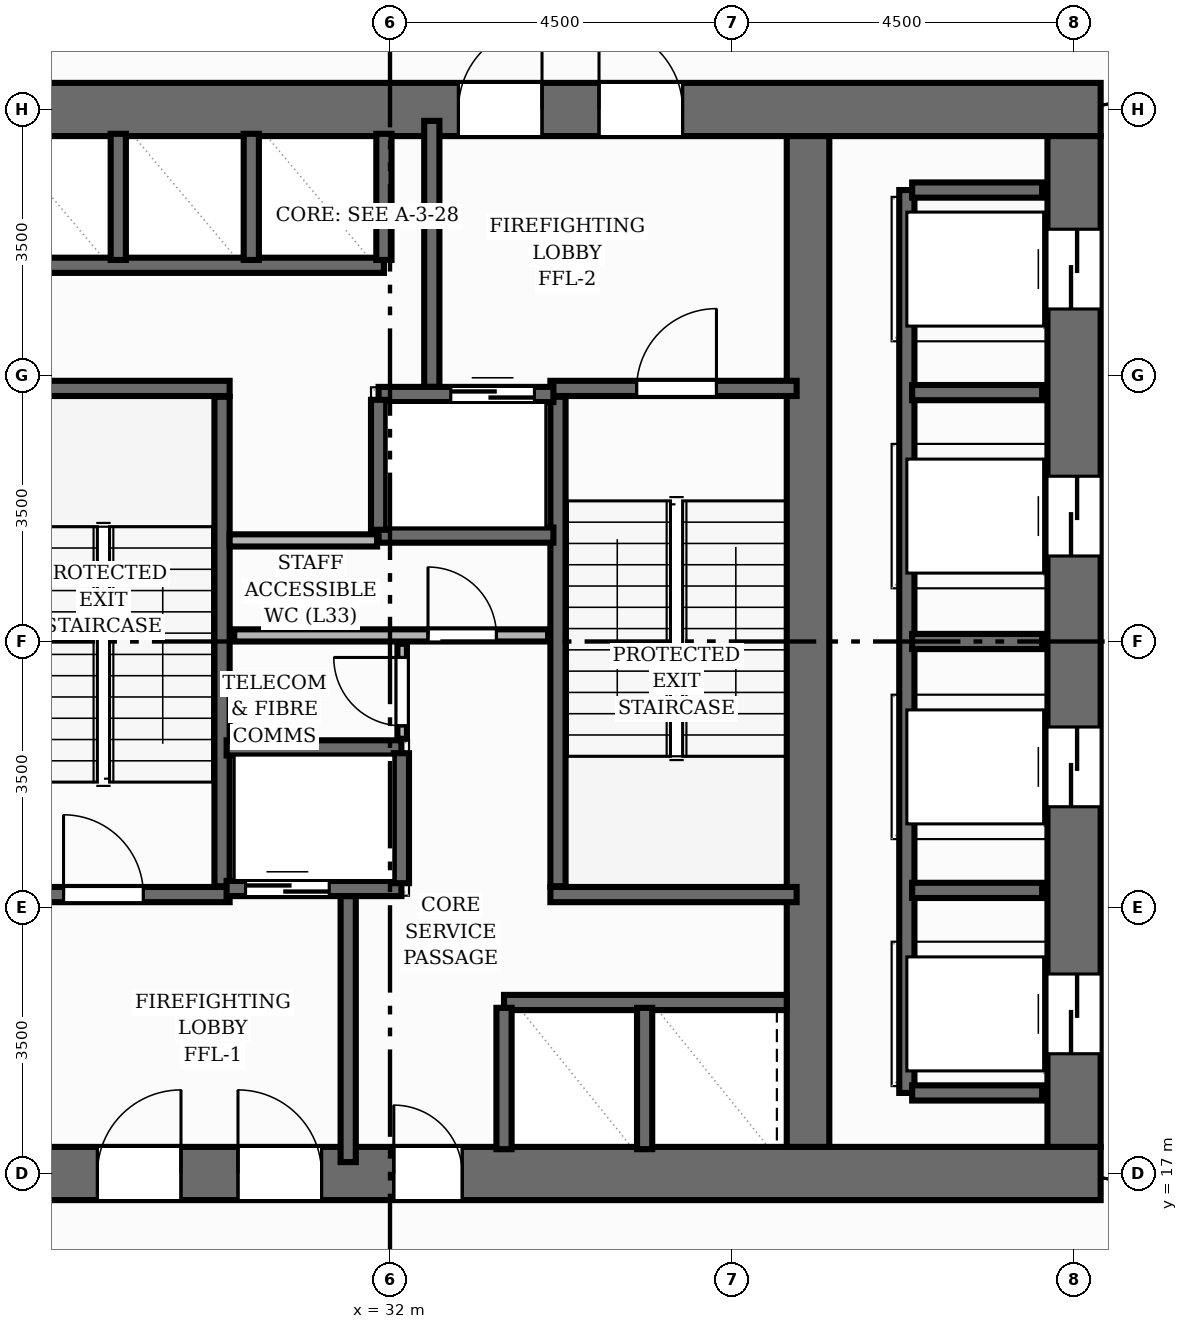
"""IFC4 building model, lengths in metres.
Left out: names, types, materials, properties, quantities, classifications, styles, units other than length and angle.
Written with IfcOpenShell. Run it as: python <this file> out.ifc"""

import sys

from ifc_helpers import new_model, si_unit, direction, frame, frame_2d, origin, place, context, subcontext, project, spatial, rectangle, extrude, element, fill, save


model = new_model("IFC4")
c1 = context("Model", 3, precision=1e-05, world=origin(), true_north=direction((0.0, 1.0)))
c2 = subcontext(c1, "Body", "Model", "MODEL_VIEW")
j1 = project(units=[si_unit("LENGTHUNIT", "METRE"), si_unit("PLANEANGLEUNIT", "RADIAN")], contexts=[c1])
p1 = place(None, origin())
s1 = spatial("IfcSite", under=j1, at=p1, CompositionType="ELEMENT")
p2 = place(p1, origin())
s2 = spatial("IfcBuilding", under=s1, at=p2, CompositionType="ELEMENT")
p3 = place(p2, frame((0.0, 0.0, 112.48)))
s3 = spatial("IfcBuildingStorey", under=s2, at=p3, CompositionType="ELEMENT", Elevation=112.48)
p4 = place(p3, frame((22.65, 17.0, 0.0), z_axis=(0.0, 0.0, 1.0), x_axis=(1.0, 0.0, 0.0)))
e1 = element("IfcWall", 1, at=p4, inside=s3, PredefinedType="SHEAR", context=c2, shape_type="SweptSolid", body=[
    extrude(rectangle(XDim=18.7, YDim=0.7, at=frame_2d((9.35, 0.0))), origin(), (0.0, 0.0, 1.0), 4.48),
])
p5 = place(p4, frame((5.5, 0.0, 0.0)))
e2 = element("IfcOpeningElement", 2, at=p5, cuts=e1, PredefinedType="OPENING", context=c2, shape_type="SweptSolid", body=[
    extrude(rectangle(XDim=1.1, YDim=2.15, at=frame_2d((0.55, 1.075))), frame((0.0, 0.36, 0.0), z_axis=(0.0, -1.0, 0.0), x_axis=(1.0, 0.0, 0.0)), (0.0, 0.0, 1.0), 0.72),
])
p6 = place(p4, frame((7.35, 0.0, 0.0)))
e3 = element("IfcOpeningElement", 3, at=p6, cuts=e1, PredefinedType="OPENING", context=c2, shape_type="SweptSolid", body=[
    extrude(rectangle(XDim=1.1, YDim=2.15, at=frame_2d((0.55, 1.075))), frame((0.0, 0.36, 0.0), z_axis=(0.0, -1.0, 0.0), x_axis=(1.0, 0.0, 0.0)), (0.0, 0.0, 1.0), 0.72),
])
p7 = place(p4, frame((9.4, 0.0, 0.0)))
e4 = element("IfcOpeningElement", 4, at=p7, cuts=e1, PredefinedType="OPENING", context=c2, shape_type="SweptSolid", body=[
    extrude(rectangle(XDim=0.9, YDim=2.1, at=frame_2d((0.45, 1.05))), frame((0.0, 0.36, 0.0), z_axis=(0.0, -1.0, 0.0), x_axis=(1.0, 0.0, 0.0)), (0.0, 0.0, 1.0), 0.72),
])
p8 = place(p3, frame((22.65, 31.0, 0.0), z_axis=(0.0, 0.0, 1.0), x_axis=(1.0, 0.0, 0.0)))
e5 = element("IfcWall", 5, at=p8, inside=s3, PredefinedType="SHEAR", context=c2, shape_type="SweptSolid", body=[
    extrude(rectangle(XDim=18.7, YDim=0.7, at=frame_2d((9.35, 0.0))), origin(), (0.0, 0.0, 1.0), 4.48),
])
p9 = place(p8, frame((10.25, 0.0, 0.0)))
e6 = element("IfcOpeningElement", 6, at=p9, cuts=e5, PredefinedType="OPENING", context=c2, shape_type="SweptSolid", body=[
    extrude(rectangle(XDim=1.1, YDim=2.15, at=frame_2d((0.55, 1.075))), frame((0.0, 0.36, 0.0), z_axis=(0.0, -1.0, 0.0), x_axis=(1.0, 0.0, 0.0)), (0.0, 0.0, 1.0), 0.72),
])
p10 = place(p8, frame((12.1, 0.0, 0.0)))
e7 = element("IfcOpeningElement", 7, at=p10, cuts=e5, PredefinedType="OPENING", context=c2, shape_type="SweptSolid", body=[
    extrude(rectangle(XDim=1.1, YDim=2.15, at=frame_2d((0.55, 1.075))), frame((0.0, 0.36, 0.0), z_axis=(0.0, -1.0, 0.0), x_axis=(1.0, 0.0, 0.0)), (0.0, 0.0, 1.0), 0.72),
])
p11 = place(p3, frame((41.0, 17.35, 0.0), z_axis=(0.0, 0.0, 1.0), x_axis=(0.0, 1.0, 0.0)))
e8 = element("IfcWall", 8, at=p11, inside=s3, PredefinedType="SHEAR", context=c2, shape_type="SweptSolid", body=[
    extrude(rectangle(XDim=13.3, YDim=0.7, at=frame_2d((6.65, 0.0))), origin(), (0.0, 0.0, 1.0), 4.48),
])
p12 = place(p11, frame((1.225, 0.0, 0.0)))
e9 = element("IfcOpeningElement", 9, at=p12, cuts=e8, PredefinedType="OPENING", context=c2, shape_type="SweptSolid", body=[
    extrude(rectangle(XDim=1.05, YDim=2.15, at=frame_2d((0.525, 1.075))), frame((0.0, 0.36, 0.0), z_axis=(0.0, -1.0, 0.0), x_axis=(1.0, 0.0, 0.0)), (0.0, 0.0, 1.0), 0.72),
])
p13 = place(p11, frame((4.475, 0.0, 0.0)))
e10 = element("IfcOpeningElement", 10, at=p13, cuts=e8, PredefinedType="OPENING", context=c2, shape_type="SweptSolid", body=[
    extrude(rectangle(XDim=1.05, YDim=2.15, at=frame_2d((0.525, 1.075))), frame((0.0, 0.36, 0.0), z_axis=(0.0, -1.0, 0.0), x_axis=(1.0, 0.0, 0.0)), (0.0, 0.0, 1.0), 0.72),
])
p14 = place(p11, frame((7.775, 0.0, 0.0)))
e11 = element("IfcOpeningElement", 11, at=p14, cuts=e8, PredefinedType="OPENING", context=c2, shape_type="SweptSolid", body=[
    extrude(rectangle(XDim=1.05, YDim=2.15, at=frame_2d((0.525, 1.075))), frame((0.0, 0.36, 0.0), z_axis=(0.0, -1.0, 0.0), x_axis=(1.0, 0.0, 0.0)), (0.0, 0.0, 1.0), 0.72),
])
p15 = place(p11, frame((11.025, 0.0, 0.0)))
e12 = element("IfcOpeningElement", 12, at=p15, cuts=e8, PredefinedType="OPENING", context=c2, shape_type="SweptSolid", body=[
    extrude(rectangle(XDim=1.05, YDim=2.15, at=frame_2d((0.525, 1.075))), frame((0.0, 0.36, 0.0), z_axis=(0.0, -1.0, 0.0), x_axis=(1.0, 0.0, 0.0)), (0.0, 0.0, 1.0), 0.72),
])
p16 = place(p3, frame((37.5, 17.35, 0.0), z_axis=(0.0, 0.0, 1.0), x_axis=(0.0, 1.0, 0.0)))
e13 = element("IfcWall", 13, at=p16, inside=s3, PredefinedType="SHEAR", context=c2, shape_type="SweptSolid", body=[
    extrude(rectangle(XDim=13.3, YDim=0.56, at=frame_2d((6.65, 0.0))), origin(), (0.0, 0.0, 1.0), 4.48),
])
p17 = place(p3, frame((29.79, 20.78, 0.0), z_axis=(0.0, 0.0, 1.0), x_axis=(0.0, 1.0, 0.0)))
e14 = element("IfcWall", 14, at=p17, inside=s3, PredefinedType="SHEAR", context=c2, shape_type="SweptSolid", body=[
    extrude(rectangle(XDim=6.44, YDim=0.2, at=frame_2d((3.22, 0.0))), origin(), (0.0, 0.0, 1.0), 4.48),
])
p18 = place(p3, frame((26.65, 27.33, 0.0), z_axis=(0.0, 0.0, 1.0), x_axis=(1.0, 0.0, 0.0)))
e15 = element("IfcWall", 15, at=p18, inside=s3, PredefinedType="SHEAR", context=c2, shape_type="SweptSolid", body=[
    extrude(rectangle(XDim=3.24, YDim=0.2, at=frame_2d((1.62, 0.0))), origin(), (0.0, 0.0, 1.0), 4.48),
])
p19 = place(p3, frame((26.65, 20.67, 0.0), z_axis=(0.0, 0.0, 1.0), x_axis=(1.0, 0.0, 0.0)))
e16 = element("IfcWall", 16, at=p19, inside=s3, PredefinedType="SHEAR", context=c2, shape_type="SweptSolid", body=[
    extrude(rectangle(XDim=3.24, YDim=0.2, at=frame_2d((1.62, 0.0))), origin(), (0.0, 0.0, 1.0), 4.48),
])
p20 = place(p19, frame((1.055, 0.0, 0.0)))
e17 = element("IfcOpeningElement", 17, at=p20, cuts=e16, PredefinedType="OPENING", context=c2, shape_type="SweptSolid", body=[
    extrude(rectangle(XDim=1.05, YDim=2.15, at=frame_2d((0.525, 1.075))), frame((0.0, 0.11, 0.0), z_axis=(0.0, -1.0, 0.0), x_axis=(1.0, 0.0, 0.0)), (0.0, 0.0, 1.0), 0.22),
])
p21 = place(p3, frame((34.21, 20.78, 0.0), z_axis=(0.0, 0.0, 1.0), x_axis=(0.0, 1.0, 0.0)))
e18 = element("IfcWall", 18, at=p21, inside=s3, PredefinedType="SHEAR", context=c2, shape_type="SweptSolid", body=[
    extrude(rectangle(XDim=6.44, YDim=0.2, at=frame_2d((3.22, 0.0))), origin(), (0.0, 0.0, 1.0), 4.48),
])
p22 = place(p3, frame((34.11, 20.67, 0.0), z_axis=(0.0, 0.0, 1.0), x_axis=(1.0, 0.0, 0.0)))
e19 = element("IfcWall", 19, at=p22, inside=s3, PredefinedType="SHEAR", context=c2, shape_type="SweptSolid", body=[
    extrude(rectangle(XDim=3.24, YDim=0.2, at=frame_2d((1.62, 0.0))), origin(), (0.0, 0.0, 1.0), 4.48),
])
p23 = place(p3, frame((34.11, 27.33, 0.0), z_axis=(0.0, 0.0, 1.0), x_axis=(1.0, 0.0, 0.0)))
e20 = element("IfcWall", 20, at=p23, inside=s3, PredefinedType="SHEAR", context=c2, shape_type="SweptSolid", body=[
    extrude(rectangle(XDim=3.24, YDim=0.2, at=frame_2d((1.62, 0.0))), origin(), (0.0, 0.0, 1.0), 4.48),
])
p24 = place(p23, frame((1.135, 0.0, 0.0)))
e21 = element("IfcOpeningElement", 21, at=p24, cuts=e20, PredefinedType="OPENING", context=c2, shape_type="SweptSolid", body=[
    extrude(rectangle(XDim=1.05, YDim=2.15, at=frame_2d((0.525, 1.075))), frame((0.0, 0.11, 0.0), z_axis=(0.0, -1.0, 0.0), x_axis=(1.0, 0.0, 0.0)), (0.0, 0.0, 1.0), 0.22),
])
for number, where, z_axis, x_axis in (
    (22, (31.45, 17.15, 0.0), (0.0, 0.0, 1.0), (0.0, 1.0, 0.0)),
    (23, (32.55, 27.35, 0.0), (0.0, 0.0, 1.0), (0.0, 1.0, 0.0)),
):
    element("IfcWall", number, at=place(p3, frame(where, z_axis=z_axis, x_axis=x_axis)), inside=s3, PredefinedType="SHEAR", context=c2, shape_type="SweptSolid", body=[
        extrude(rectangle(XDim=3.5, YDim=0.2, at=frame_2d((1.75, 0.0))), origin(), (0.0, 0.0, 1.0), 4.48),
    ])
p25 = place(p3, frame((29.85, 20.75, 0.0), z_axis=(0.0, 0.0, 1.0), x_axis=(1.0, 0.0, 0.0)))
e24 = element("IfcWall", 24, at=p25, inside=s3, PredefinedType="SHEAR", context=c2, shape_type="SweptSolid", body=[
    extrude(rectangle(XDim=2.3, YDim=0.2, at=frame_2d((1.15, 0.0))), origin(), (0.0, 0.0, 1.0), 4.48),
])
p26 = place(p25, frame((0.25, 0.0, 0.0)))
e25 = element("IfcOpeningElement", 25, at=p26, cuts=e24, PredefinedType="OPENING", context=c2, shape_type="SweptSolid", body=[
    extrude(rectangle(XDim=1.1, YDim=2.15, at=frame_2d((0.55, 1.075))), frame((0.0, 0.11, 0.0), z_axis=(0.0, -1.0, 0.0), x_axis=(1.0, 0.0, 0.0)), (0.0, 0.0, 1.0), 0.22),
])
p27 = place(p3, frame((29.85, 22.6, 0.0), z_axis=(0.0, 0.0, 1.0), x_axis=(1.0, 0.0, 0.0)))
e26 = element("IfcWall", 26, at=p27, inside=s3, PredefinedType="SHEAR", context=c2, shape_type="SweptSolid", body=[
    extrude(rectangle(XDim=2.3, YDim=0.2, at=frame_2d((1.15, 0.0))), origin(), (0.0, 0.0, 1.0), 4.48),
])
p28 = place(p3, frame((32.15, 20.82, 0.0), z_axis=(0.0, 0.0, 1.0), x_axis=(0.0, 1.0, 0.0)))
e27 = element("IfcWall", 27, at=p28, inside=s3, PredefinedType="SHEAR", context=c2, shape_type="SweptSolid", body=[
    extrude(rectangle(XDim=1.71, YDim=0.2, at=frame_2d((0.855, 0.0))), origin(), (0.0, 0.0, 1.0), 4.48),
])
p29 = place(p3, frame((31.85, 27.25, 0.0), z_axis=(0.0, 0.0, 1.0), x_axis=(1.0, 0.0, 0.0)))
e28 = element("IfcWall", 28, at=p29, inside=s3, PredefinedType="SHEAR", context=c2, shape_type="SweptSolid", body=[
    extrude(rectangle(XDim=2.3, YDim=0.2, at=frame_2d((1.15, 0.0))), origin(), (0.0, 0.0, 1.0), 4.48),
])
p30 = place(p29, frame((0.95, 0.0, 0.0)))
e29 = element("IfcOpeningElement", 29, at=p30, cuts=e28, PredefinedType="OPENING", context=c2, shape_type="SweptSolid", body=[
    extrude(rectangle(XDim=1.1, YDim=2.15, at=frame_2d((0.55, 1.075))), frame((0.0, 0.11, 0.0), z_axis=(0.0, -1.0, 0.0), x_axis=(1.0, 0.0, 0.0)), (0.0, 0.0, 1.0), 0.22),
])
p31 = place(p3, frame((31.85, 25.4, 0.0), z_axis=(0.0, 0.0, 1.0), x_axis=(1.0, 0.0, 0.0)))
e30 = element("IfcWall", 30, at=p31, inside=s3, PredefinedType="SHEAR", context=c2, shape_type="SweptSolid", body=[
    extrude(rectangle(XDim=2.3, YDim=0.2, at=frame_2d((1.15, 0.0))), origin(), (0.0, 0.0, 1.0), 4.48),
])
p32 = place(p3, frame((31.85, 25.47, 0.0), z_axis=(0.0, 0.0, 1.0), x_axis=(0.0, 1.0, 0.0)))
e31 = element("IfcWall", 31, at=p32, inside=s3, PredefinedType="SHEAR", context=c2, shape_type="SweptSolid", body=[
    extrude(rectangle(XDim=1.71, YDim=0.2, at=frame_2d((0.855, 0.0))), origin(), (0.0, 0.0, 1.0), 4.48),
])
p33 = place(p3, frame((38.8, 18.06, 0.0), z_axis=(0.0, 0.0, 1.0), x_axis=(0.0, 1.0, 0.0)))
e32 = element("IfcWall", 32, at=p33, inside=s3, PredefinedType="SHEAR", context=c2, shape_type="SweptSolid", body=[
    extrude(rectangle(XDim=11.88, YDim=0.2, at=frame_2d((5.94, 0.0))), origin(), (0.0, 0.0, 1.0), 4.48),
])
for number, where, z_axis, x_axis in (
    (33, (38.87, 18.06, 0.0), (0.0, 0.0, 1.0), (1.0, 0.0, 0.0)),
    (34, (38.87, 29.94, 0.0), (0.0, 0.0, 1.0), (1.0, 0.0, 0.0)),
    (35, (38.87, 20.725, 0.0), (0.0, 0.0, 1.0), (1.0, 0.0, 0.0)),
    (36, (38.87, 24.0, 0.0), (0.0, 0.0, 1.0), (1.0, 0.0, 0.0)),
    (37, (38.87, 27.275, 0.0), (0.0, 0.0, 1.0), (1.0, 0.0, 0.0)),
):
    element("IfcWall", number, at=place(p3, frame(where, z_axis=z_axis, x_axis=x_axis)), inside=s3, PredefinedType="SHEAR", context=c2, shape_type="SweptSolid", body=[
        extrude(rectangle(XDim=1.71, YDim=0.2, at=frame_2d((0.855, 0.0))), origin(), (0.0, 0.0, 1.0), 4.48),
    ])
p34 = place(p3, frame((26.68, 28.95, 0.0), z_axis=(0.0, 0.0, 1.0), x_axis=(1.0, 0.0, 0.0)))
e38 = element("IfcWall", 38, at=p34, inside=s3, PredefinedType="SHEAR", context=c2, shape_type="SweptSolid", body=[
    extrude(rectangle(XDim=5.24, YDim=0.2, at=frame_2d((2.62, 0.0))), origin(), (0.0, 0.0, 1.0), 4.48),
])
for number, where, z_axis, x_axis in (
    (39, (31.92, 29.02, 0.0), (0.0, 0.0, 1.0), (0.0, 1.0, 0.0)),
    (40, (28.425, 29.02, 0.0), (0.0, 0.0, 1.0), (0.0, 1.0, 0.0)),
    (41, (30.175, 29.02, 0.0), (0.0, 0.0, 1.0), (0.0, 1.0, 0.0)),
):
    element("IfcWall", number, at=place(p3, frame(where, z_axis=z_axis, x_axis=x_axis)), inside=s3, PredefinedType="SHEAR", context=c2, shape_type="SweptSolid", body=[
        extrude(rectangle(XDim=1.66, YDim=0.2, at=frame_2d((0.83, 0.0))), origin(), (0.0, 0.0, 1.0), 4.48),
    ])
p35 = place(p3, frame((33.5, 19.25, 0.0), z_axis=(0.0, 0.0, 1.0), x_axis=(1.0, 0.0, 0.0)))
e42 = element("IfcWall", 42, at=p35, inside=s3, PredefinedType="SHEAR", context=c2, shape_type="SweptSolid", body=[
    extrude(rectangle(XDim=3.72, YDim=0.2, at=frame_2d((1.86, 0.0))), origin(), (0.0, 0.0, 1.0), 4.48),
])
for number, where, z_axis, x_axis in (
    (43, (33.5, 17.32, 0.0), (0.0, 0.0, 1.0), (0.0, 1.0, 0.0)),
    (44, (35.35, 17.32, 0.0), (0.0, 0.0, 1.0), (0.0, 1.0, 0.0)),
):
    element("IfcWall", number, at=place(p3, frame(where, z_axis=z_axis, x_axis=x_axis)), inside=s3, PredefinedType="SHEAR", context=c2, shape_type="SweptSolid", body=[
        extrude(rectangle(XDim=1.86, YDim=0.2, at=frame_2d((0.93, 0.0))), origin(), (0.0, 0.0, 1.0), 4.48),
    ])
p36 = place(p3, frame((29.95, 24.08, 0.0), z_axis=(0.0, 0.0, 1.0), x_axis=(1.0, 0.0, 0.0)))
e45 = element("IfcWall", 45, at=p36, inside=s3, PredefinedType="PLUMBINGWALL", context=c2, shape_type="SweptSolid", body=[
    extrude(rectangle(XDim=4.13, YDim=0.16, at=frame_2d((2.065, 0.0))), origin(), (0.0, 0.0, 1.0), 4.235),
])
p37 = place(p36, frame((2.55, 0.0, 0.0)))
e46 = element("IfcOpeningElement", 46, at=p37, cuts=e45, PredefinedType="OPENING", context=c2, shape_type="SweptSolid", body=[
    extrude(rectangle(XDim=0.9, YDim=2.1, at=frame_2d((0.45, 1.05))), frame((0.0, 0.09, 0.0), z_axis=(0.0, -1.0, 0.0), x_axis=(1.0, 0.0, 0.0)), (0.0, 0.0, 1.0), 0.18),
])
p38 = place(p3, frame((32.16, 22.72, 0.0), z_axis=(0.0, 0.0, 1.0), x_axis=(0.0, 1.0, 0.0)))
e47 = element("IfcWall", 47, at=p38, inside=s3, PredefinedType="PARTITIONING", context=c2, shape_type="SweptSolid", body=[
    extrude(rectangle(XDim=1.25, YDim=0.125, at=frame_2d((0.625, 0.0))), origin(), (0.0, 0.0, 1.0), 4.235),
])
p39 = place(p38, frame((0.17, 0.0, 0.0)))
e48 = element("IfcOpeningElement", 48, at=p39, cuts=e47, PredefinedType="OPENING", context=c2, shape_type="SweptSolid", body=[
    extrude(rectangle(XDim=0.9, YDim=2.1, at=frame_2d((0.45, 1.05))), frame((0.0, 0.073, 0.0), z_axis=(0.0, -1.0, 0.0), x_axis=(1.0, 0.0, 0.0)), (0.0, 0.0, 1.0), 0.145),
])
p40 = place(p3, frame((29.89, 25.33, 0.0), z_axis=(0.0, 0.0, 1.0), x_axis=(1.0, 0.0, 0.0)))
e49 = element("IfcWall", 49, at=p40, inside=s3, PredefinedType="PLUMBINGWALL", context=c2, shape_type="SweptSolid", body=[
    extrude(rectangle(XDim=1.94, YDim=0.16, at=frame_2d((0.97, 0.0))), origin(), (0.0, 0.0, 1.0), 4.235),
])
p41 = place(p20, origin())
e50 = element("IfcDoor", 50, at=p41, inside=s3, OperationType="SINGLE_SWING_LEFT", PredefinedType="DOOR", context=c2, shape_type="SweptSolid", body=[
    extrude(rectangle(XDim=1.05, YDim=2.15, at=frame_2d((0.525, 1.075))), frame((0.0, 0.025, 0.0), z_axis=(0.0, -1.0, 0.0), x_axis=(1.0, 0.0, 0.0)), (0.0, 0.0, 1.0), 0.05),
])
fill(e17, e50)
p42 = place(p24, origin())
e51 = element("IfcDoor", 51, at=p42, inside=s3, OperationType="SINGLE_SWING_RIGHT", PredefinedType="DOOR", context=c2, shape_type="SweptSolid", body=[
    extrude(rectangle(XDim=1.05, YDim=2.15, at=frame_2d((0.525, 1.075))), frame((0.0, 0.025, 0.0), z_axis=(0.0, -1.0, 0.0), x_axis=(1.0, 0.0, 0.0)), (0.0, 0.0, 1.0), 0.05),
])
fill(e21, e51)
p43 = place(p5, origin())
e52 = element("IfcDoor", 52, at=p43, inside=s3, OperationType="SINGLE_SWING_RIGHT", PredefinedType="DOOR", context=c2, shape_type="SweptSolid", body=[
    extrude(rectangle(XDim=1.1, YDim=2.15, at=frame_2d((0.55, 1.075))), frame((0.0, 0.025, 0.0), z_axis=(0.0, -1.0, 0.0), x_axis=(1.0, 0.0, 0.0)), (0.0, 0.0, 1.0), 0.05),
])
fill(e2, e52)
p44 = place(p6, origin())
e53 = element("IfcDoor", 53, at=p44, inside=s3, OperationType="SINGLE_SWING_LEFT", PredefinedType="DOOR", context=c2, shape_type="SweptSolid", body=[
    extrude(rectangle(XDim=1.1, YDim=2.15, at=frame_2d((0.55, 1.075))), frame((0.0, 0.025, 0.0), z_axis=(0.0, -1.0, 0.0), x_axis=(1.0, 0.0, 0.0)), (0.0, 0.0, 1.0), 0.05),
])
fill(e3, e53)
p45 = place(p9, origin())
e54 = element("IfcDoor", 54, at=p45, inside=s3, OperationType="SINGLE_SWING_RIGHT", PredefinedType="DOOR", context=c2, shape_type="SweptSolid", body=[
    extrude(rectangle(XDim=1.1, YDim=2.15, at=frame_2d((0.55, 1.075))), frame((0.0, 0.025, 0.0), z_axis=(0.0, -1.0, 0.0), x_axis=(1.0, 0.0, 0.0)), (0.0, 0.0, 1.0), 0.05),
])
fill(e6, e54)
p46 = place(p10, origin())
e55 = element("IfcDoor", 55, at=p46, inside=s3, OperationType="SINGLE_SWING_LEFT", PredefinedType="DOOR", context=c2, shape_type="SweptSolid", body=[
    extrude(rectangle(XDim=1.1, YDim=2.15, at=frame_2d((0.55, 1.075))), frame((0.0, 0.025, 0.0), z_axis=(0.0, -1.0, 0.0), x_axis=(1.0, 0.0, 0.0)), (0.0, 0.0, 1.0), 0.05),
])
fill(e7, e55)
p47 = place(p26, origin())
e56 = element("IfcDoor", 56, at=p47, inside=s3, OperationType="DOUBLE_DOOR_SLIDING", PredefinedType="DOOR", context=c2, shape_type="SweptSolid", body=[
    extrude(rectangle(XDim=1.1, YDim=2.15, at=frame_2d((0.55, 1.075))), frame((0.0, 0.025, 0.0), z_axis=(0.0, -1.0, 0.0), x_axis=(1.0, 0.0, 0.0)), (0.0, 0.0, 1.0), 0.05),
])
fill(e25, e56)
p48 = place(p30, origin())
e57 = element("IfcDoor", 57, at=p48, inside=s3, OperationType="DOUBLE_DOOR_SLIDING", PredefinedType="DOOR", context=c2, shape_type="SweptSolid", body=[
    extrude(rectangle(XDim=1.1, YDim=2.15, at=frame_2d((0.55, 1.075))), frame((0.0, 0.025, 0.0), z_axis=(0.0, -1.0, 0.0), x_axis=(1.0, 0.0, 0.0)), (0.0, 0.0, 1.0), 0.05),
])
fill(e29, e57)
p49 = place(p12, origin())
e58 = element("IfcDoor", 58, at=p49, inside=s3, OperationType="DOUBLE_DOOR_SLIDING", PredefinedType="DOOR", context=c2, shape_type="SweptSolid", body=[
    extrude(rectangle(XDim=1.05, YDim=2.15, at=frame_2d((0.525, 1.075))), frame((0.0, 0.025, 0.0), z_axis=(0.0, -1.0, 0.0), x_axis=(1.0, 0.0, 0.0)), (0.0, 0.0, 1.0), 0.05),
])
fill(e9, e58)
p50 = place(p13, origin())
e59 = element("IfcDoor", 59, at=p50, inside=s3, OperationType="DOUBLE_DOOR_SLIDING", PredefinedType="DOOR", context=c2, shape_type="SweptSolid", body=[
    extrude(rectangle(XDim=1.05, YDim=2.15, at=frame_2d((0.525, 1.075))), frame((0.0, 0.025, 0.0), z_axis=(0.0, -1.0, 0.0), x_axis=(1.0, 0.0, 0.0)), (0.0, 0.0, 1.0), 0.05),
])
fill(e10, e59)
p51 = place(p14, origin())
e60 = element("IfcDoor", 60, at=p51, inside=s3, OperationType="DOUBLE_DOOR_SLIDING", PredefinedType="DOOR", context=c2, shape_type="SweptSolid", body=[
    extrude(rectangle(XDim=1.05, YDim=2.15, at=frame_2d((0.525, 1.075))), frame((0.0, 0.025, 0.0), z_axis=(0.0, -1.0, 0.0), x_axis=(1.0, 0.0, 0.0)), (0.0, 0.0, 1.0), 0.05),
])
fill(e11, e60)
p52 = place(p15, origin())
e61 = element("IfcDoor", 61, at=p52, inside=s3, OperationType="DOUBLE_DOOR_SLIDING", PredefinedType="DOOR", context=c2, shape_type="SweptSolid", body=[
    extrude(rectangle(XDim=1.05, YDim=2.15, at=frame_2d((0.525, 1.075))), frame((0.0, 0.025, 0.0), z_axis=(0.0, -1.0, 0.0), x_axis=(1.0, 0.0, 0.0)), (0.0, 0.0, 1.0), 0.05),
])
fill(e12, e61)
p53 = place(p7, origin())
e62 = element("IfcDoor", 62, at=p53, inside=s3, OperationType="SINGLE_SWING_LEFT", PredefinedType="DOOR", context=c2, shape_type="SweptSolid", body=[
    extrude(rectangle(XDim=0.9, YDim=2.1, at=frame_2d((0.45, 1.05))), frame((0.0, 0.025, 0.0), z_axis=(0.0, -1.0, 0.0), x_axis=(1.0, 0.0, 0.0)), (0.0, 0.0, 1.0), 0.05),
])
fill(e4, e62)
p54 = place(p37, origin())
e63 = element("IfcDoor", 63, at=p54, inside=s3, OperationType="SINGLE_SWING_LEFT", PredefinedType="DOOR", context=c2, shape_type="SweptSolid", body=[
    extrude(rectangle(XDim=0.9, YDim=2.1, at=frame_2d((0.45, 1.05))), frame((0.0, 0.025, 0.0), z_axis=(0.0, -1.0, 0.0), x_axis=(1.0, 0.0, 0.0)), (0.0, 0.0, 1.0), 0.05),
])
fill(e46, e63)
p55 = place(p39, origin())
e64 = element("IfcDoor", 64, at=p55, inside=s3, OperationType="SINGLE_SWING_RIGHT", PredefinedType="DOOR", context=c2, shape_type="SweptSolid", body=[
    extrude(rectangle(XDim=0.9, YDim=2.1, at=frame_2d((0.45, 1.05))), frame((0.0, 0.025, 0.0), z_axis=(0.0, -1.0, 0.0), x_axis=(1.0, 0.0, 0.0)), (0.0, 0.0, 1.0), 0.05),
])
fill(e48, e64)
save(model, sys.argv[1])
